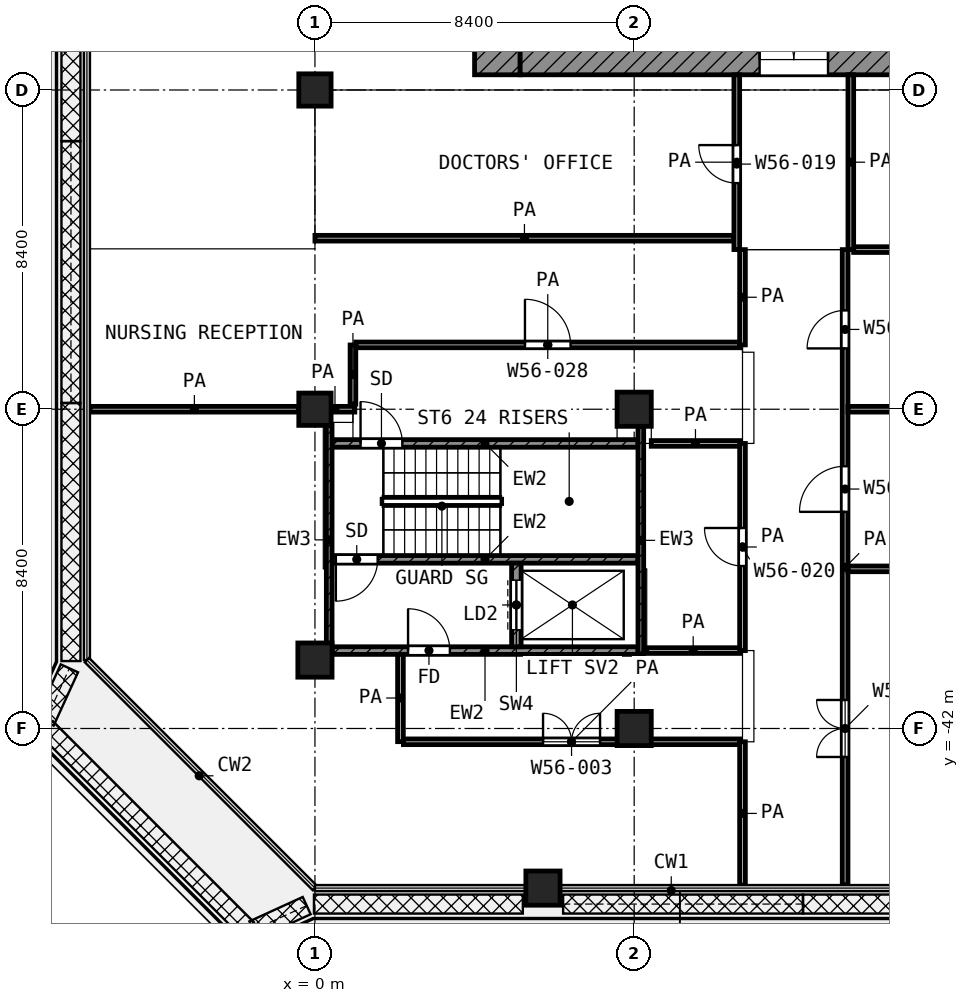
"""IFC4 building model, lengths in metres.
Left out: names, types, materials, properties, quantities, classifications, styles, units other than length and angle.
Written with IfcOpenShell. Run it as: python <this file> out.ifc"""

import sys

from ifc_helpers import new_model, si_unit, direction, frame, frame_2d, origin, origin_2d, place, context, subcontext, project, spatial, rectangle, extrude, element, fill, save


model = new_model("IFC4")
c1 = context("Model", 3, precision=1e-05, world=origin(), true_north=direction((0.0, 1.0)))
c2 = subcontext(c1, "Body", "Model", "MODEL_VIEW")
j1 = project(units=[si_unit("LENGTHUNIT", "METRE"), si_unit("PLANEANGLEUNIT", "RADIAN")], contexts=[c1])
p1 = place(None, origin())
s1 = spatial("IfcSite", under=j1, at=p1, CompositionType="ELEMENT")
p2 = place(p1, origin())
s2 = spatial("IfcBuilding", under=s1, at=p2, CompositionType="ELEMENT")
p3 = place(p2, frame((0.0, 0.0, 264.2)))
s3 = spatial("IfcBuildingStorey", under=s2, at=p3, CompositionType="ELEMENT", Elevation=264.2)
for number, where, z_axis, x_axis in (
    (1, (0.0, -25.2, 0.0), (0.0, 0.0, 1.0), (1.0, 0.0, 0.0)),
    (2, (0.0, -33.6, 0.0), (0.0, 0.0, 1.0), (1.0, 0.0, 0.0)),
):
    element("IfcColumn", number, at=place(p3, frame(where, z_axis=z_axis, x_axis=x_axis)), inside=s3, PredefinedType="COLUMN", context=c2, shape_type="SweptSolid", body=[
        extrude(rectangle(XDim=0.85, YDim=0.85, at=origin_2d()), origin(), (0.0, 0.0, 1.0), 4.2),
    ])
for number, where, z_axis, x_axis in (
    (3, (8.4, -33.6, 0.0), (0.0, 0.0, 1.0), (1.0, 0.0, 0.0)),
    (4, (0.0, -40.2, 0.0), (0.0, 0.0, 1.0), (1.0, 0.0, 0.0)),
    (5, (8.4, -42.0, 0.0), (0.0, 0.0, 1.0), (1.0, 0.0, 0.0)),
    (6, (6.0, -46.2, 0.0), (0.0, 0.0, 1.0), (1.0, 0.0, 0.0)),
):
    element("IfcColumn", number, at=place(p3, frame(where, z_axis=z_axis, x_axis=x_axis)), inside=s3, PredefinedType="COLUMN", context=c2, shape_type="SweptSolid", body=[
        extrude(rectangle(XDim=0.9, YDim=0.9, at=origin_2d()), origin(), (0.0, 0.0, 1.0), 4.2),
    ])
p4 = place(p3, frame((4.8, -24.8, 0.0), z_axis=(0.0, 0.0, 1.0), x_axis=(0.0, 1.0, 0.0)))
e7 = element("IfcWall", 7, at=p4, inside=s3, PredefinedType="SHEAR", context=c2, shape_type="SweptSolid", body=[
    extrude(rectangle(XDim=19.4, YDim=1.2, at=frame_2d((9.7, 0.0))), origin(), (0.0, 0.0, 1.0), 3.6),
])
p5 = place(p4, frame((11.25, 0.0, 0.0)))
e8 = element("IfcOpeningElement", 8, at=p5, cuts=e7, PredefinedType="OPENING", context=c2, shape_type="SweptSolid", body=[
    extrude(rectangle(XDim=1.1, YDim=2.1, at=frame_2d((0.55, 1.05))), frame((0.0, 0.61, 0.0), z_axis=(0.0, -1.0, 0.0), x_axis=(1.0, 0.0, 0.0)), (0.0, 0.0, 1.0), 1.22),
])
p6 = place(p4, frame((1.95, 0.0, 0.0)))
e9 = element("IfcOpeningElement", 9, at=p6, cuts=e7, PredefinedType="OPENING", context=c2, shape_type="SweptSolid", body=[
    extrude(rectangle(XDim=1.1, YDim=2.1, at=frame_2d((0.55, 1.05))), frame((0.0, 0.61, 0.0), z_axis=(0.0, -1.0, 0.0), x_axis=(1.0, 0.0, 0.0)), (0.0, 0.0, 1.0), 1.22),
])
p7 = place(p3, frame((5.4, -24.4, 0.0), z_axis=(0.0, 0.0, 1.0), x_axis=(1.0, 0.0, 0.0)))
e10 = element("IfcWall", 10, at=p7, inside=s3, PredefinedType="SHEAR", context=c2, shape_type="SweptSolid", body=[
    extrude(rectangle(XDim=18.6, YDim=0.8, at=frame_2d((9.3, 0.0))), origin(), (0.0, 0.0, 1.0), 3.6),
])
p8 = place(p7, frame((6.3, 0.0, 0.0)))
e11 = element("IfcOpeningElement", 11, at=p8, cuts=e10, PredefinedType="OPENING", context=c2, shape_type="SweptSolid", body=[
    extrude(rectangle(XDim=1.8, YDim=2.1, at=frame_2d((0.9, 1.05))), frame((0.0, 0.41, 0.0), z_axis=(0.0, -1.0, 0.0), x_axis=(1.0, 0.0, 0.0)), (0.0, 0.0, 1.0), 0.82),
])
p9 = place(p3, frame((0.375, -40.05, 0.0), z_axis=(0.0, 0.0, 1.0), x_axis=(0.0, 1.0, 0.0)))
e12 = element("IfcWall", 12, at=p9, inside=s3, PredefinedType="SHEAR", context=c2, shape_type="SweptSolid", body=[
    extrude(rectangle(XDim=6.025, YDim=0.15, at=frame_2d((3.013, 0.0))), origin(), (0.0, 0.0, 1.0), 3.6),
])
p10 = place(p3, frame((8.575, -40.05, 0.0), z_axis=(0.0, 0.0, 1.0), x_axis=(0.0, 1.0, 0.0)))
e13 = element("IfcWall", 13, at=p10, inside=s3, PredefinedType="SHEAR", context=c2, shape_type="SweptSolid", body=[
    extrude(rectangle(XDim=6.0, YDim=0.15, at=frame_2d((3.0, 0.0))), origin(), (0.0, 0.0, 1.0), 3.6),
])
p11 = place(p3, frame((0.45, -34.5, 0.0), z_axis=(0.0, 0.0, 1.0), x_axis=(1.0, 0.0, 0.0)))
e14 = element("IfcWall", 14, at=p11, inside=s3, PredefinedType="SHEAR", context=c2, shape_type="SweptSolid", body=[
    extrude(rectangle(XDim=8.05, YDim=0.2, at=frame_2d((4.025, 0.0))), origin(), (0.0, 0.0, 1.0), 3.6),
])
p12 = place(p11, frame((0.75, 0.0, 0.0)))
e15 = element("IfcOpeningElement", 15, at=p12, cuts=e14, PredefinedType="OPENING", context=c2, shape_type="SweptSolid", body=[
    extrude(rectangle(XDim=1.1, YDim=2.1, at=frame_2d((0.55, 1.05))), frame((0.0, 0.11, 0.0), z_axis=(0.0, -1.0, 0.0), x_axis=(1.0, 0.0, 0.0)), (0.0, 0.0, 1.0), 0.22),
])
p13 = place(p3, frame((0.45, -37.55, 0.0), z_axis=(0.0, 0.0, 1.0), x_axis=(1.0, 0.0, 0.0)))
e16 = element("IfcWall", 16, at=p13, inside=s3, PredefinedType="SHEAR", context=c2, shape_type="SweptSolid", body=[
    extrude(rectangle(XDim=8.05, YDim=0.2, at=frame_2d((4.025, 0.0))), origin(), (0.0, 0.0, 1.0), 3.6),
])
p14 = place(p13, frame((0.1, 0.0, 0.0)))
e17 = element("IfcOpeningElement", 17, at=p14, cuts=e16, PredefinedType="OPENING", context=c2, shape_type="SweptSolid", body=[
    extrude(rectangle(XDim=1.1, YDim=2.1, at=frame_2d((0.55, 1.05))), frame((0.0, 0.11, 0.0), z_axis=(0.0, -1.0, 0.0), x_axis=(1.0, 0.0, 0.0)), (0.0, 0.0, 1.0), 0.22),
])
p15 = place(p3, frame((0.45, -39.95, 0.0), z_axis=(0.0, 0.0, 1.0), x_axis=(1.0, 0.0, 0.0)))
e18 = element("IfcWall", 18, at=p15, inside=s3, PredefinedType="SHEAR", context=c2, shape_type="SweptSolid", body=[
    extrude(rectangle(XDim=8.05, YDim=0.2, at=frame_2d((4.025, 0.0))), origin(), (0.0, 0.0, 1.0), 3.6),
])
p16 = place(p15, frame((2.0, 0.0, 0.0)))
e19 = element("IfcOpeningElement", 19, at=p16, cuts=e18, PredefinedType="OPENING", context=c2, shape_type="SweptSolid", body=[
    extrude(rectangle(XDim=1.1, YDim=2.1, at=frame_2d((0.55, 1.05))), frame((0.0, 0.11, 0.0), z_axis=(0.0, -1.0, 0.0), x_axis=(1.0, 0.0, 0.0)), (0.0, 0.0, 1.0), 0.22),
])
p17 = place(p3, frame((5.3, -39.85, 0.0), z_axis=(0.0, 0.0, 1.0), x_axis=(0.0, 1.0, 0.0)))
e20 = element("IfcWall", 20, at=p17, inside=s3, PredefinedType="SHEAR", context=c2, shape_type="SweptSolid", body=[
    extrude(rectangle(XDim=2.2, YDim=0.25, at=frame_2d((1.1, 0.0))), origin(), (0.0, 0.0, 1.0), 3.6),
])
p18 = place(p17, frame((0.45, 0.0, 0.0)))
e21 = element("IfcOpeningElement", 21, at=p18, cuts=e20, PredefinedType="OPENING", context=c2, shape_type="SweptSolid", body=[
    extrude(rectangle(XDim=1.3, YDim=2.1, at=frame_2d((0.65, 1.05))), frame((0.0, 0.135, 0.0), z_axis=(0.0, -1.0, 0.0), x_axis=(1.0, 0.0, 0.0)), (0.0, 0.0, 1.0), 0.27),
])
p19 = place(p3, frame((2.328, -42.35, 0.0), z_axis=(0.0, 0.0, 1.0), x_axis=(1.0, 0.0, 0.0)))
e22 = element("IfcWall", 22, at=p19, inside=s3, PredefinedType="PARTITIONING", context=c2, shape_type="SweptSolid", body=[
    extrude(rectangle(XDim=8.847, YDim=0.15, at=frame_2d((4.424, 0.0))), origin(), (0.0, 0.0, 1.0), 3.6),
])
p20 = place(p19, frame((3.674, 0.0, 0.0)))
e23 = element("IfcOpeningElement", 23, at=p20, cuts=e22, PredefinedType="OPENING", context=c2, shape_type="SweptSolid", body=[
    extrude(rectangle(XDim=1.5, YDim=2.1, at=frame_2d((0.75, 1.05))), frame((0.0, 0.085, 0.0), z_axis=(0.0, -1.0, 0.0), x_axis=(1.0, 0.0, 0.0)), (0.0, 0.0, 1.0), 0.17),
])
p21 = place(p3, frame((8.73, -39.95, 0.0), z_axis=(0.0, 0.0, 1.0), x_axis=(1.0, 0.0, 0.0)))
e24 = element("IfcWall", 24, at=p21, inside=s3, PredefinedType="PARTITIONING", context=c2, shape_type="SweptSolid", body=[
    extrude(rectangle(XDim=2.445, YDim=0.15, at=frame_2d((1.223, 0.0))), origin(), (0.0, 0.0, 1.0), 3.6),
])
p22 = place(p3, frame((14.025, -37.8, 0.0), z_axis=(0.0, 0.0, 1.0), x_axis=(1.0, 0.0, 0.0)))
e25 = element("IfcWall", 25, at=p22, inside=s3, PredefinedType="PARTITIONING", context=c2, shape_type="SweptSolid", body=[
    extrude(rectangle(XDim=11.095, YDim=0.15, at=frame_2d((5.548, 0.0))), origin(), (0.0, 0.0, 1.0), 2.7),
])
p23 = place(p3, frame((8.85, -34.5, 0.0), z_axis=(0.0, 0.0, 1.0), x_axis=(1.0, 0.0, 0.0)))
e26 = element("IfcWall", 26, at=p23, inside=s3, PredefinedType="PARTITIONING", context=c2, shape_type="SweptSolid", body=[
    extrude(rectangle(XDim=2.325, YDim=0.15, at=frame_2d((1.163, 0.0))), origin(), (0.0, 0.0, 1.0), 3.6),
])
p24 = place(p3, frame((-5.92, -33.6, 0.0), z_axis=(0.0, 0.0, 1.0), x_axis=(1.0, 0.0, 0.0)))
e27 = element("IfcWall", 27, at=p24, inside=s3, PredefinedType="PARTITIONING", context=c2, shape_type="SweptSolid", body=[
    extrude(rectangle(XDim=5.495, YDim=0.15, at=frame_2d((2.748, 0.0))), origin(), (0.0, 0.0, 1.0), 3.6),
])
p25 = place(p3, frame((0.006, -33.6, 0.0), z_axis=(0.0, 0.0, 1.0), x_axis=(1.0, 0.0, 0.0)))
e28 = element("IfcWall", 28, at=p25, inside=s3, PredefinedType="PARTITIONING", context=c2, shape_type="SweptSolid", body=[
    extrude(rectangle(XDim=1.043, YDim=0.15, at=frame_2d((0.521, 0.0))), origin(), (0.0, 0.0, 1.0), 3.6),
])
p26 = place(p3, frame((14.025, -33.6, 0.0), z_axis=(0.0, 0.0, 1.0), x_axis=(1.0, 0.0, 0.0)))
e29 = element("IfcWall", 29, at=p26, inside=s3, PredefinedType="PARTITIONING", context=c2, shape_type="SweptSolid", body=[
    extrude(rectangle(XDim=11.095, YDim=0.15, at=frame_2d((5.548, 0.0))), origin(), (0.0, 0.0, 1.0), 2.7),
])
p27 = place(p3, frame((1.077, -31.907, 0.0), z_axis=(0.0, 0.0, 1.0), x_axis=(1.0, 0.0, 0.0)))
e30 = element("IfcWall", 30, at=p27, inside=s3, PredefinedType="PARTITIONING", context=c2, shape_type="SweptSolid", body=[
    extrude(rectangle(XDim=10.098, YDim=0.15, at=frame_2d((5.049, 0.0))), origin(), (0.0, 0.0, 1.0), 3.6),
])
p28 = place(p27, frame((4.449, 0.0, 0.0)))
e31 = element("IfcOpeningElement", 31, at=p28, cuts=e30, PredefinedType="OPENING", context=c2, shape_type="SweptSolid", body=[
    extrude(rectangle(XDim=1.2, YDim=2.1, at=frame_2d((0.6, 1.05))), frame((0.0, 0.085, 0.0), z_axis=(0.0, -1.0, 0.0), x_axis=(1.0, 0.0, 0.0)), (0.0, 0.0, 1.0), 0.17),
])
p29 = place(p3, frame((14.175, -29.4, 0.0), z_axis=(0.0, 0.0, 1.0), x_axis=(1.0, 0.0, 0.0)))
e32 = element("IfcWall", 32, at=p29, inside=s3, PredefinedType="PARTITIONING", context=c2, shape_type="SweptSolid", body=[
    extrude(rectangle(XDim=10.95, YDim=0.15, at=frame_2d((5.475, 0.0))), origin(), (0.0, 0.0, 1.0), 3.6),
])
p30 = place(p3, frame((0.0, -29.1, 0.0), z_axis=(0.0, 0.0, 1.0), x_axis=(1.0, 0.0, 0.0)))
e33 = element("IfcWall", 33, at=p30, inside=s3, PredefinedType="PARTITIONING", context=c2, shape_type="SweptSolid", body=[
    extrude(rectangle(XDim=11.025, YDim=0.15, at=frame_2d((5.512, 0.0))), origin(), (0.0, 0.0, 1.0), 3.6),
])
p31 = place(p3, frame((1.0, -33.465, 0.0), z_axis=(0.0, 0.0, 1.0), x_axis=(0.0, 1.0, 0.0)))
e34 = element("IfcWall", 34, at=p31, inside=s3, PredefinedType="PARTITIONING", context=c2, shape_type="SweptSolid", body=[
    extrude(rectangle(XDim=1.556, YDim=0.15, at=frame_2d((0.778, 0.0))), origin(), (0.0, 0.0, 1.0), 3.6),
])
p32 = place(p3, frame((2.25, -42.347, 0.0), z_axis=(0.0, 0.0, 1.0), x_axis=(0.0, 1.0, 0.0)))
e35 = element("IfcWall", 35, at=p32, inside=s3, PredefinedType="PARTITIONING", context=c2, shape_type="SweptSolid", body=[
    extrude(rectangle(XDim=2.297, YDim=0.15, at=frame_2d((1.148, 0.0))), origin(), (0.0, 0.0, 1.0), 3.6),
])
p33 = place(p3, frame((11.1, -29.399, 0.0), z_axis=(0.0, 0.0, 1.0), x_axis=(0.0, 1.0, 0.0)))
e36 = element("IfcWall", 36, at=p33, inside=s3, PredefinedType="PARTITIONING", context=c2, shape_type="SweptSolid", body=[
    extrude(rectangle(XDim=4.599, YDim=0.15, at=frame_2d((2.299, 0.0))), origin(), (0.0, 0.0, 1.0), 3.6),
])
p34 = place(p33, frame((1.749, 0.0, 0.0)))
e37 = element("IfcOpeningElement", 37, at=p34, cuts=e36, PredefinedType="OPENING", context=c2, shape_type="SweptSolid", body=[
    extrude(rectangle(XDim=1.0, YDim=2.1, at=frame_2d((0.5, 1.05))), frame((0.0, 0.085, 0.0), z_axis=(0.0, -1.0, 0.0), x_axis=(1.0, 0.0, 0.0)), (0.0, 0.0, 1.0), 0.17),
])
p35 = place(p3, frame((11.25, -46.12, 0.0), z_axis=(0.0, 0.0, 1.0), x_axis=(0.0, 1.0, 0.0)))
e38 = element("IfcWall", 38, at=p35, inside=s3, PredefinedType="PARTITIONING", context=c2, shape_type="SweptSolid", body=[
    extrude(rectangle(XDim=3.77, YDim=0.15, at=frame_2d((1.885, 0.0))), origin(), (0.0, 0.0, 1.0), 3.6),
])
p36 = place(p3, frame((11.25, -39.95, 0.0), z_axis=(0.0, 0.0, 1.0), x_axis=(0.0, 1.0, 0.0)))
e39 = element("IfcWall", 39, at=p36, inside=s3, PredefinedType="PARTITIONING", context=c2, shape_type="SweptSolid", body=[
    extrude(rectangle(XDim=5.45, YDim=0.15, at=frame_2d((2.725, 0.0))), origin(), (0.0, 0.0, 1.0), 3.6),
])
p37 = place(p36, frame((2.225, 0.0, 0.0)))
e40 = element("IfcOpeningElement", 40, at=p37, cuts=e39, PredefinedType="OPENING", context=c2, shape_type="SweptSolid", body=[
    extrude(rectangle(XDim=1.0, YDim=2.1, at=frame_2d((0.5, 1.05))), frame((0.0, 0.085, 0.0), z_axis=(0.0, -1.0, 0.0), x_axis=(1.0, 0.0, 0.0)), (0.0, 0.0, 1.0), 0.17),
])
p38 = place(p3, frame((11.25, -31.907, 0.0), z_axis=(0.0, 0.0, 1.0), x_axis=(0.0, 1.0, 0.0)))
e41 = element("IfcWall", 41, at=p38, inside=s3, PredefinedType="PARTITIONING", context=c2, shape_type="SweptSolid", body=[
    extrude(rectangle(XDim=2.507, YDim=0.15, at=frame_2d((1.253, 0.0))), origin(), (0.0, 0.0, 1.0), 3.6),
])
p39 = place(p3, frame((13.95, -46.12, 0.0), z_axis=(0.0, 0.0, 1.0), x_axis=(0.0, 1.0, 0.0)))
e42 = element("IfcWall", 42, at=p39, inside=s3, PredefinedType="PARTITIONING", context=c2, shape_type="SweptSolid", body=[
    extrude(rectangle(XDim=16.72, YDim=0.15, at=frame_2d((8.36, 0.0))), origin(), (0.0, 0.0, 1.0), 3.6),
])
p40 = place(p39, frame((14.12, 0.0, 0.0)))
e43 = element("IfcOpeningElement", 43, at=p40, cuts=e42, PredefinedType="OPENING", context=c2, shape_type="SweptSolid", body=[
    extrude(rectangle(XDim=1.0, YDim=2.1, at=frame_2d((0.5, 1.05))), frame((0.0, 0.085, 0.0), z_axis=(0.0, -1.0, 0.0), x_axis=(1.0, 0.0, 0.0)), (0.0, 0.0, 1.0), 0.17),
])
p41 = place(p39, frame((9.82, 0.0, 0.0)))
e44 = element("IfcOpeningElement", 44, at=p41, cuts=e42, PredefinedType="OPENING", context=c2, shape_type="SweptSolid", body=[
    extrude(rectangle(XDim=1.2, YDim=2.1, at=frame_2d((0.6, 1.05))), frame((0.0, 0.085, 0.0), z_axis=(0.0, -1.0, 0.0), x_axis=(1.0, 0.0, 0.0)), (0.0, 0.0, 1.0), 0.17),
])
p42 = place(p39, frame((3.37, 0.0, 0.0)))
e45 = element("IfcOpeningElement", 45, at=p42, cuts=e42, PredefinedType="OPENING", context=c2, shape_type="SweptSolid", body=[
    extrude(rectangle(XDim=1.5, YDim=2.1, at=frame_2d((0.75, 1.05))), frame((0.0, 0.085, 0.0), z_axis=(0.0, -1.0, 0.0), x_axis=(1.0, 0.0, 0.0)), (0.0, 0.0, 1.0), 0.17),
])
p43 = place(p3, frame((14.1, -29.4, 0.0), z_axis=(0.0, 0.0, 1.0), x_axis=(0.0, 1.0, 0.0)))
e46 = element("IfcWall", 46, at=p43, inside=s3, PredefinedType="PARTITIONING", context=c2, shape_type="SweptSolid", body=[
    extrude(rectangle(XDim=4.6, YDim=0.15, at=frame_2d((2.3, 0.0))), origin(), (0.0, 0.0, 1.0), 3.6),
])
p44 = place(p8, origin())
e47 = element("IfcDoor", 47, at=p44, inside=s3, OperationType="DOUBLE_DOOR_SINGLE_SWING", PredefinedType="DOOR", context=c2, shape_type="SweptSolid", body=[
    extrude(rectangle(XDim=1.8, YDim=2.1, at=frame_2d((0.9, 1.05))), frame((0.0, 0.025, 0.0), z_axis=(0.0, -1.0, 0.0), x_axis=(1.0, 0.0, 0.0)), (0.0, 0.0, 1.0), 0.05),
])
fill(e11, e47)
p45 = place(p12, origin())
e48 = element("IfcDoor", 48, at=p45, inside=s3, OperationType="SINGLE_SWING_LEFT", PredefinedType="DOOR", context=c2, shape_type="SweptSolid", body=[
    extrude(rectangle(XDim=1.1, YDim=2.1, at=frame_2d((0.55, 1.05))), frame((0.0, 0.025, 0.0), z_axis=(0.0, -1.0, 0.0), x_axis=(1.0, 0.0, 0.0)), (0.0, 0.0, 1.0), 0.05),
])
fill(e15, e48)
p46 = place(p14, frame((1.1, 0.0, 0.0), z_axis=(0.0, 0.0, 1.0), x_axis=(-1.0, 0.0, 0.0)))
e49 = element("IfcDoor", 49, at=p46, inside=s3, OperationType="SINGLE_SWING_LEFT", PredefinedType="DOOR", context=c2, shape_type="SweptSolid", body=[
    extrude(rectangle(XDim=1.1, YDim=2.1, at=frame_2d((0.55, 1.05))), frame((0.0, 0.025, 0.0), z_axis=(0.0, -1.0, 0.0), x_axis=(1.0, 0.0, 0.0)), (0.0, 0.0, 1.0), 0.05),
])
fill(e17, e49)
p47 = place(p18, origin())
e50 = element("IfcDoor", 50, at=p47, inside=s3, OperationType="DOUBLE_DOOR_SLIDING", PredefinedType="DOOR", context=c2, shape_type="SweptSolid", body=[
    extrude(rectangle(XDim=1.3, YDim=2.1, at=frame_2d((0.65, 1.05))), frame((0.0, 0.025, 0.0), z_axis=(0.0, -1.0, 0.0), x_axis=(1.0, 0.0, 0.0)), (0.0, 0.0, 1.0), 0.05),
])
fill(e21, e50)
p48 = place(p16, origin())
e51 = element("IfcDoor", 51, at=p48, inside=s3, OperationType="SINGLE_SWING_LEFT", PredefinedType="DOOR", context=c2, shape_type="SweptSolid", body=[
    extrude(rectangle(XDim=1.1, YDim=2.1, at=frame_2d((0.55, 1.05))), frame((0.0, 0.025, 0.0), z_axis=(0.0, -1.0, 0.0), x_axis=(1.0, 0.0, 0.0)), (0.0, 0.0, 1.0), 0.05),
])
fill(e19, e51)
p49 = place(p34, origin())
e52 = element("IfcDoor", 52, at=p49, inside=s3, OperationType="SINGLE_SWING_RIGHT", PredefinedType="DOOR", context=c2, shape_type="SweptSolid", body=[
    extrude(rectangle(XDim=1.0, YDim=2.1, at=frame_2d((0.5, 1.05))), frame((0.0, 0.025, 0.0), z_axis=(0.0, -1.0, 0.0), x_axis=(1.0, 0.0, 0.0)), (0.0, 0.0, 1.0), 0.05),
])
fill(e37, e52)
p50 = place(p28, origin())
e53 = element("IfcDoor", 53, at=p50, inside=s3, OperationType="SINGLE_SWING_LEFT", PredefinedType="DOOR", context=c2, shape_type="SweptSolid", body=[
    extrude(rectangle(XDim=1.2, YDim=2.1, at=frame_2d((0.6, 1.05))), frame((0.0, 0.025, 0.0), z_axis=(0.0, -1.0, 0.0), x_axis=(1.0, 0.0, 0.0)), (0.0, 0.0, 1.0), 0.05),
])
fill(e31, e53)
p51 = place(p37, origin())
e54 = element("IfcDoor", 54, at=p51, inside=s3, OperationType="SINGLE_SWING_RIGHT", PredefinedType="DOOR", context=c2, shape_type="SweptSolid", body=[
    extrude(rectangle(XDim=1.0, YDim=2.1, at=frame_2d((0.5, 1.05))), frame((0.0, 0.025, 0.0), z_axis=(0.0, -1.0, 0.0), x_axis=(1.0, 0.0, 0.0)), (0.0, 0.0, 1.0), 0.05),
])
fill(e40, e54)
p52 = place(p20, origin())
e55 = element("IfcDoor", 55, at=p52, inside=s3, OperationType="DOUBLE_DOOR_SINGLE_SWING", PredefinedType="DOOR", context=c2, shape_type="SweptSolid", body=[
    extrude(rectangle(XDim=1.5, YDim=2.1, at=frame_2d((0.75, 1.05))), frame((0.0, 0.025, 0.0), z_axis=(0.0, -1.0, 0.0), x_axis=(1.0, 0.0, 0.0)), (0.0, 0.0, 1.0), 0.05),
])
fill(e23, e55)
p53 = place(p40, origin())
e56 = element("IfcDoor", 56, at=p53, inside=s3, OperationType="SINGLE_SWING_LEFT", PredefinedType="DOOR", context=c2, shape_type="SweptSolid", body=[
    extrude(rectangle(XDim=1.0, YDim=2.1, at=frame_2d((0.5, 1.05))), frame((0.0, 0.025, 0.0), z_axis=(0.0, -1.0, 0.0), x_axis=(1.0, 0.0, 0.0)), (0.0, 0.0, 1.0), 0.05),
])
fill(e43, e56)
p54 = place(p41, origin())
e57 = element("IfcDoor", 57, at=p54, inside=s3, OperationType="SINGLE_SWING_LEFT", PredefinedType="DOOR", context=c2, shape_type="SweptSolid", body=[
    extrude(rectangle(XDim=1.2, YDim=2.1, at=frame_2d((0.6, 1.05))), frame((0.0, 0.025, 0.0), z_axis=(0.0, -1.0, 0.0), x_axis=(1.0, 0.0, 0.0)), (0.0, 0.0, 1.0), 0.05),
])
fill(e44, e57)
p55 = place(p42, origin())
e58 = element("IfcDoor", 58, at=p55, inside=s3, OperationType="DOUBLE_DOOR_SINGLE_SWING", PredefinedType="DOOR", context=c2, shape_type="SweptSolid", body=[
    extrude(rectangle(XDim=1.5, YDim=2.1, at=frame_2d((0.75, 1.05))), frame((0.0, 0.025, 0.0), z_axis=(0.0, -1.0, 0.0), x_axis=(1.0, 0.0, 0.0)), (0.0, 0.0, 1.0), 0.05),
])
fill(e45, e58)
save(model, sys.argv[1])
